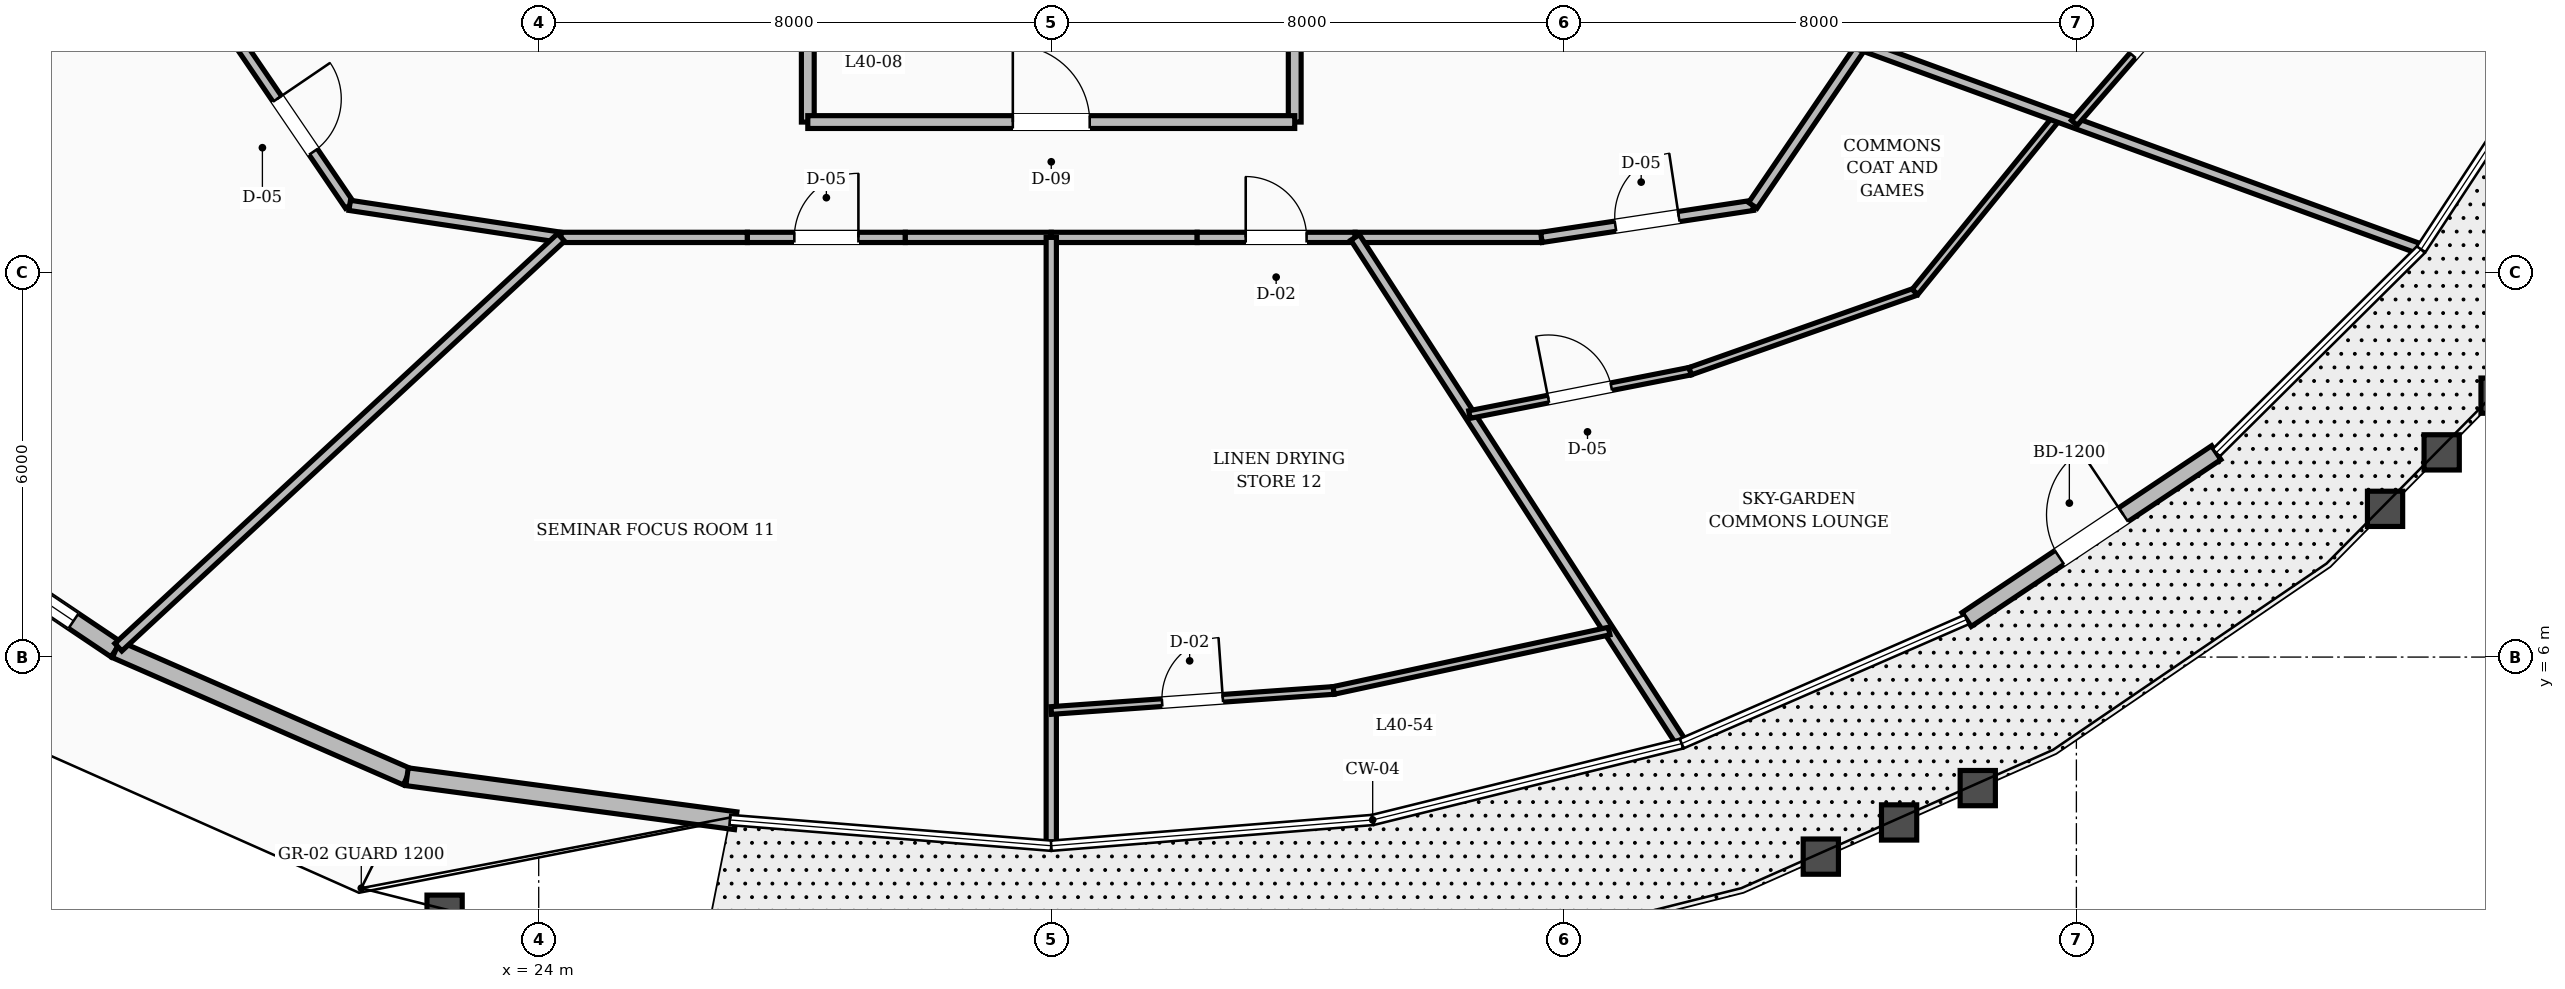
"""IFC4 building model, lengths in metres.
Left out: names, types, materials, properties, quantities, classifications, styles, units other than length and angle.
Written with IfcOpenShell. Run it as: python <this file> out.ifc"""

import sys

from ifc_helpers import new_model, si_unit, direction, frame, frame_2d, origin, place, context, subcontext, project, spatial, rectangle, extrude, element, fill, save


model = new_model("IFC4")
c1 = context("Model", 3, precision=1e-05, world=origin(), true_north=direction((0.0, 1.0)))
c2 = subcontext(c1, "Body", "Model", "MODEL_VIEW")
j1 = project(units=[si_unit("LENGTHUNIT", "METRE"), si_unit("PLANEANGLEUNIT", "RADIAN")], contexts=[c1])
p1 = place(None, origin())
s1 = spatial("IfcSite", under=j1, at=p1, CompositionType="ELEMENT")
p2 = place(p1, origin())
s2 = spatial("IfcBuilding", under=s1, at=p2, CompositionType="ELEMENT")
p3 = place(p2, frame((0.0, 0.0, 156.8)))
s3 = spatial("IfcBuildingStorey", under=s2, at=p3, CompositionType="ELEMENT", Elevation=156.8)
p4 = place(p3, frame((13.421, 8.794, 0.0), z_axis=(0.0, 0.0, 1.0), x_axis=(0.830095249601, -0.557621624931, 0.0)))
e1 = element("IfcWall", 1, at=p4, inside=s3, PredefinedType="STANDARD", context=c2, shape_type="SweptSolid", body=[
    extrude(rectangle(XDim=4.796, YDim=0.28, at=frame_2d((2.398, 0.0))), origin(), (0.0, 0.0, 1.0), 2.82),
])
p5 = place(p4, frame((0.798, 0.0, 0.8)))
e2 = element("IfcOpeningElement", 2, at=p5, cuts=e1, PredefinedType="OPENING", context=c2, shape_type="SweptSolid", body=[
    extrude(rectangle(XDim=3.2, YDim=1.65, at=frame_2d((1.6, 0.825))), frame((0.0, 0.15, 0.0), z_axis=(0.0, -1.0, 0.0), x_axis=(1.0, 0.0, 0.0)), (0.0, 0.0, 1.0), 0.3),
])
p6 = place(p3, frame((17.402, 6.12, 0.0), z_axis=(0.0, 0.0, 1.0), x_axis=(0.916185584373, -0.400754257603, 0.0)))
e3 = element("IfcWall", 3, at=p6, inside=s3, PredefinedType="STANDARD", context=c2, shape_type="SweptSolid", body=[
    extrude(rectangle(XDim=4.958, YDim=0.28, at=frame_2d((2.479, 0.0))), origin(), (0.0, 0.0, 1.0), 2.82),
])
p7 = place(p3, frame((21.945, 4.133, 0.0), z_axis=(0.0, 0.0, 1.0), x_axis=(0.991155650999, -0.132704466742, 0.0)))
e4 = element("IfcWall", 4, at=p7, inside=s3, PredefinedType="STANDARD", context=c2, shape_type="SweptSolid", body=[
    extrude(rectangle(XDim=5.175, YDim=0.28, at=frame_2d((2.587, 0.0))), origin(), (0.0, 0.0, 1.0), 2.82),
])
p8 = place(p3, frame((46.286, 6.585, 0.0), z_axis=(0.0, 0.0, 1.0), x_axis=(0.831368522851, 0.555721494286, 0.0)))
e5 = element("IfcWall", 5, at=p8, inside=s3, PredefinedType="STANDARD", context=c2, shape_type="SweptSolid", body=[
    extrude(rectangle(XDim=4.687, YDim=0.26, at=frame_2d((2.344, 0.0))), origin(), (0.0, 0.0, 1.0), 2.82),
])
p9 = place(p8, frame((1.744, 0.0, 0.0)))
e6 = element("IfcOpeningElement", 6, at=p9, cuts=e5, PredefinedType="OPENING", context=c2, shape_type="SweptSolid", body=[
    extrude(rectangle(XDim=1.2, YDim=2.15, at=frame_2d((0.6, 1.075))), frame((0.0, 0.14, 0.0), z_axis=(0.0, -1.0, 0.0), x_axis=(1.0, 0.0, 0.0)), (0.0, 0.0, 1.0), 0.28),
])
for number, where, z_axis, x_axis in (
    (7, (28.2, 14.35, 0.0), (0.0, 0.0, 1.0), (0.0, 1.0, 0.0)),
    (8, (35.8, 14.35, 0.0), (0.0, 0.0, 1.0), (0.0, 1.0, 0.0)),
):
    element("IfcWall", number, at=place(p3, frame(where, z_axis=z_axis, x_axis=x_axis)), inside=s3, PredefinedType="SOLIDWALL", context=c2, shape_type="SweptSolid", body=[
        extrude(rectangle(XDim=2.2, YDim=0.2, at=frame_2d((1.1, 0.0))), origin(), (0.0, 0.0, 1.0), 2.8),
    ])
p10 = place(p3, frame((28.2, 14.35, 0.0), z_axis=(0.0, 0.0, 1.0), x_axis=(1.0, 0.0, 0.0)))
e9 = element("IfcWall", 9, at=p10, inside=s3, PredefinedType="SOLIDWALL", context=c2, shape_type="SweptSolid", body=[
    extrude(rectangle(XDim=7.6, YDim=0.2, at=frame_2d((3.8, 0.0))), origin(), (0.0, 0.0, 1.0), 2.8),
])
p11 = place(p10, frame((3.2, 0.0, 0.0)))
e10 = element("IfcOpeningElement", 10, at=p11, cuts=e9, PredefinedType="OPENING", context=c2, shape_type="SweptSolid", body=[
    extrude(rectangle(XDim=1.2, YDim=2.1, at=frame_2d((0.6, 1.05))), frame((0.0, 0.11, 0.0), z_axis=(0.0, -1.0, 0.0), x_axis=(1.0, 0.0, 0.0)), (0.0, 0.0, 1.0), 0.22),
])
p12 = place(p3, frame((19.35, 15.548, 0.0), z_axis=(0.0, 0.0, 1.0), x_axis=(0.562674669208, -0.826678423955, 0.0)))
e11 = element("IfcWall", 11, at=p12, inside=s3, PredefinedType="SOLIDWALL", context=c2, shape_type="SweptSolid", body=[
    extrude(rectangle(XDim=3.021, YDim=0.16, at=frame_2d((1.511, 0.0))), origin(), (0.0, 0.0, 1.0), 2.8),
])
p13 = place(p12, frame((1.01, 0.0, 0.0)))
e12 = element("IfcOpeningElement", 12, at=p13, cuts=e11, PredefinedType="OPENING", context=c2, shape_type="SweptSolid", body=[
    extrude(rectangle(XDim=1.0, YDim=2.1, at=frame_2d((0.5, 1.05))), frame((0.0, 0.09, 0.0), z_axis=(0.0, -1.0, 0.0), x_axis=(1.0, 0.0, 0.0)), (0.0, 0.0, 1.0), 0.18),
])
p14 = place(p3, frame((21.05, 13.05, 0.0), z_axis=(0.0, 0.0, 1.0), x_axis=(0.988710906508, -0.149835721217, 0.0)))
e13 = element("IfcWall", 13, at=p14, inside=s3, PredefinedType="SOLIDWALL", context=c2, shape_type="SweptSolid", body=[
    extrude(rectangle(XDim=3.337, YDim=0.16, at=frame_2d((1.668, 0.0))), origin(), (0.0, 0.0, 1.0), 2.8),
])
p15 = place(p3, frame((24.349, 12.55, 0.0), z_axis=(0.0, 0.0, 1.0), x_axis=(1.0, 0.0, 0.0)))
e14 = element("IfcWall", 14, at=p15, inside=s3, PredefinedType="SOLIDWALL", context=c2, shape_type="SweptSolid", body=[
    extrude(rectangle(XDim=2.908, YDim=0.16, at=frame_2d((1.454, 0.0))), origin(), (0.0, 0.0, 1.0), 2.8),
])
p16 = place(p3, frame((27.257, 12.55, 0.0), z_axis=(0.0, 0.0, 1.0), x_axis=(1.0, 0.0, 0.0)))
e15 = element("IfcWall", 15, at=p16, inside=s3, PredefinedType="SOLIDWALL", context=c2, shape_type="SweptSolid", body=[
    extrude(rectangle(XDim=2.465, YDim=0.16, at=frame_2d((1.232, 0.0))), origin(), (0.0, 0.0, 1.0), 2.8),
])
p17 = place(p16, frame((0.733, 0.0, 0.0)))
e16 = element("IfcOpeningElement", 16, at=p17, cuts=e15, PredefinedType="OPENING", context=c2, shape_type="SweptSolid", body=[
    extrude(rectangle(XDim=1.0, YDim=2.1, at=frame_2d((0.5, 1.05))), frame((0.0, 0.09, 0.0), z_axis=(0.0, -1.0, 0.0), x_axis=(1.0, 0.0, 0.0)), (0.0, 0.0, 1.0), 0.18),
])
for number, where, z_axis, x_axis in (
    (17, (29.722, 12.55, 0.0), (0.0, 0.0, 1.0), (1.0, 0.0, 0.0)),
    (18, (32.0, 12.55, 0.0), (0.0, 0.0, 1.0), (1.0, 0.0, 0.0)),
):
    element("IfcWall", number, at=place(p3, frame(where, z_axis=z_axis, x_axis=x_axis)), inside=s3, PredefinedType="SOLIDWALL", context=c2, shape_type="SweptSolid", body=[
        extrude(rectangle(XDim=2.278, YDim=0.16, at=frame_2d((1.139, 0.0))), origin(), (0.0, 0.0, 1.0), 2.8),
    ])
p18 = place(p3, frame((34.278, 12.55, 0.0), z_axis=(0.0, 0.0, 1.0), x_axis=(1.0, 0.0, 0.0)))
e19 = element("IfcWall", 19, at=p18, inside=s3, PredefinedType="SOLIDWALL", context=c2, shape_type="SweptSolid", body=[
    extrude(rectangle(XDim=2.465, YDim=0.16, at=frame_2d((1.232, 0.0))), origin(), (0.0, 0.0, 1.0), 2.8),
])
p19 = place(p18, frame((0.758, 0.0, 0.0)))
e20 = element("IfcOpeningElement", 20, at=p19, cuts=e19, PredefinedType="OPENING", context=c2, shape_type="SweptSolid", body=[
    extrude(rectangle(XDim=0.95, YDim=2.1, at=frame_2d((0.475, 1.05))), frame((0.0, 0.09, 0.0), z_axis=(0.0, -1.0, 0.0), x_axis=(1.0, 0.0, 0.0)), (0.0, 0.0, 1.0), 0.18),
])
p20 = place(p3, frame((36.743, 12.55, 0.0), z_axis=(0.0, 0.0, 1.0), x_axis=(1.0, 0.0, 0.0)))
e21 = element("IfcWall", 21, at=p20, inside=s3, PredefinedType="SOLIDWALL", context=c2, shape_type="SweptSolid", body=[
    extrude(rectangle(XDim=2.908, YDim=0.16, at=frame_2d((1.454, 0.0))), origin(), (0.0, 0.0, 1.0), 2.8),
])
p21 = place(p3, frame((39.651, 12.55, 0.0), z_axis=(0.0, 0.0, 1.0), x_axis=(0.988710906508, 0.149835721217, 0.0)))
e22 = element("IfcWall", 22, at=p21, inside=s3, PredefinedType="SOLIDWALL", context=c2, shape_type="SweptSolid", body=[
    extrude(rectangle(XDim=3.337, YDim=0.16, at=frame_2d((1.668, 0.0))), origin(), (0.0, 0.0, 1.0), 2.8),
])
p22 = place(p21, frame((1.168, 0.0, 0.0)))
e23 = element("IfcOpeningElement", 23, at=p22, cuts=e22, PredefinedType="OPENING", context=c2, shape_type="SweptSolid", body=[
    extrude(rectangle(XDim=1.0, YDim=2.1, at=frame_2d((0.5, 1.05))), frame((0.0, 0.09, 0.0), z_axis=(0.0, -1.0, 0.0), x_axis=(1.0, 0.0, 0.0)), (0.0, 0.0, 1.0), 0.18),
])
p23 = place(p3, frame((42.95, 13.05, 0.0), z_axis=(0.0, 0.0, 1.0), x_axis=(0.562674669208, 0.826678423955, 0.0)))
e24 = element("IfcWall", 24, at=p23, inside=s3, PredefinedType="SOLIDWALL", context=c2, shape_type="SweptSolid", body=[
    extrude(rectangle(XDim=3.021, YDim=0.16, at=frame_2d((1.511, 0.0))), origin(), (0.0, 0.0, 1.0), 2.8),
])
p24 = place(p3, frame((36.743, 12.55, 0.0), z_axis=(0.0, 0.0, 1.0), x_axis=(0.542222596655, -0.840234881254, 0.0)))
e25 = element("IfcWall", 25, at=p24, inside=s3, PredefinedType="SOLIDWALL", context=c2, shape_type="SweptSolid", body=[
    extrude(rectangle(XDim=9.352, YDim=0.16, at=frame_2d((4.676, 0.0))), origin(), (0.0, 0.0, 1.0), 2.8),
])
p25 = place(p3, frame((38.527, 9.785, 0.0), z_axis=(0.0, 0.0, 1.0), x_axis=(0.981217112096, 0.192906658595, 0.0)))
e26 = element("IfcWall", 26, at=p25, inside=s3, PredefinedType="PARTITIONING", context=c2, shape_type="SweptSolid", body=[
    extrude(rectangle(XDim=3.512, YDim=0.12, at=frame_2d((1.756, 0.0))), origin(), (0.0, 0.0, 1.0), 2.8),
])
p26 = place(p25, frame((1.256, 0.0, 0.0)))
e27 = element("IfcOpeningElement", 27, at=p26, cuts=e26, PredefinedType="OPENING", context=c2, shape_type="SweptSolid", body=[
    extrude(rectangle(XDim=1.0, YDim=2.1, at=frame_2d((0.5, 1.05))), frame((0.0, 0.07, 0.0), z_axis=(0.0, -1.0, 0.0), x_axis=(1.0, 0.0, 0.0)), (0.0, 0.0, 1.0), 0.14),
])
p27 = place(p3, frame((41.973, 10.462, 0.0), z_axis=(0.0, 0.0, 1.0), x_axis=(0.943136844467, 0.332404712075, 0.0)))
e28 = element("IfcWall", 28, at=p27, inside=s3, PredefinedType="PARTITIONING", context=c2, shape_type="SweptSolid", body=[
    extrude(rectangle(XDim=3.72, YDim=0.12, at=frame_2d((1.86, 0.0))), origin(), (0.0, 0.0, 1.0), 2.8),
])
p28 = place(p3, frame((45.482, 11.699, 0.0), z_axis=(0.0, 0.0, 1.0), x_axis=(0.631043665678, 0.775747311957, 0.0)))
e29 = element("IfcWall", 29, at=p28, inside=s3, PredefinedType="PARTITIONING", context=c2, shape_type="SweptSolid", body=[
    extrude(rectangle(XDim=3.524, YDim=0.12, at=frame_2d((1.762, 0.0))), origin(), (0.0, 0.0, 1.0), 2.8),
])
p29 = place(p3, frame((44.65, 15.548, 0.0), z_axis=(0.0, 0.0, 1.0), x_axis=(0.939495403678, -0.342561507568, 0.0)))
e30 = element("IfcWall", 30, at=p29, inside=s3, PredefinedType="SOLIDWALL", context=c2, shape_type="SweptSolid", body=[
    extrude(rectangle(XDim=9.244, YDim=0.16, at=frame_2d((4.622, 0.0))), origin(), (0.0, 0.0, 1.0), 2.8),
])
p30 = place(p3, frame((47.968, 14.338, 0.0), z_axis=(0.0, 0.0, 1.0), x_axis=(0.655911700686, 0.754837625522, 0.0)))
e31 = element("IfcWall", 31, at=p30, inside=s3, PredefinedType="PARTITIONING", context=c2, shape_type="SweptSolid", body=[
    extrude(rectangle(XDim=3.645, YDim=0.12, at=frame_2d((1.823, 0.0))), origin(), (0.0, 0.0, 1.0), 2.8),
])
p31 = place(p30, frame((1.393, 0.0, 0.0)))
e32 = element("IfcOpeningElement", 32, at=p31, cuts=e31, PredefinedType="OPENING", context=c2, shape_type="SweptSolid", body=[
    extrude(rectangle(XDim=0.86, YDim=2.1, at=frame_2d((0.43, 1.05))), frame((0.0, 0.07, 0.0), z_axis=(0.0, -1.0, 0.0), x_axis=(1.0, 0.0, 0.0)), (0.0, 0.0, 1.0), 0.14),
])
p32 = place(p3, frame((24.349, 12.55, 0.0), z_axis=(0.0, 0.0, 1.0), x_axis=(-0.733869336749, -0.679290656921, 0.0)))
e33 = element("IfcWall", 33, at=p32, inside=s3, PredefinedType="SOLIDWALL", context=c2, shape_type="SweptSolid", body=[
    extrude(rectangle(XDim=9.416, YDim=0.16, at=frame_2d((4.708, 0.0))), origin(), (0.0, 0.0, 1.0), 2.8),
])
p33 = place(p3, frame((32.0, 12.55, 0.0), z_axis=(0.0, 0.0, 1.0), x_axis=(0.0, -1.0, 0.0)))
e34 = element("IfcWall", 34, at=p33, inside=s3, PredefinedType="SOLIDWALL", context=c2, shape_type="SweptSolid", body=[
    extrude(rectangle(XDim=9.444, YDim=0.16, at=frame_2d((4.722, 0.0))), origin(), (0.0, 0.0, 1.0), 2.8),
])
p34 = place(p3, frame((32.0, 5.167, 0.0), z_axis=(0.0, 0.0, 1.0), x_axis=(0.99748834157, 0.070830843796, 0.0)))
e35 = element("IfcWall", 35, at=p34, inside=s3, PredefinedType="PARTITIONING", context=c2, shape_type="SweptSolid", body=[
    extrude(rectangle(XDim=4.419, YDim=0.12, at=frame_2d((2.209, 0.0))), origin(), (0.0, 0.0, 1.0), 2.8),
])
p35 = place(p34, frame((1.734, 0.0, 0.0)))
e36 = element("IfcOpeningElement", 36, at=p35, cuts=e35, PredefinedType="OPENING", context=c2, shape_type="SweptSolid", body=[
    extrude(rectangle(XDim=0.95, YDim=2.1, at=frame_2d((0.475, 1.05))), frame((0.0, 0.07, 0.0), z_axis=(0.0, -1.0, 0.0), x_axis=(1.0, 0.0, 0.0)), (0.0, 0.0, 1.0), 0.14),
])
p36 = place(p3, frame((36.408, 5.479, 0.0), z_axis=(0.0, 0.0, 1.0), x_axis=(0.977549074865, 0.21070786941, 0.0)))
e37 = element("IfcWall", 37, at=p36, inside=s3, PredefinedType="PARTITIONING", context=c2, shape_type="SweptSolid", body=[
    extrude(rectangle(XDim=4.398, YDim=0.12, at=frame_2d((2.199, 0.0))), origin(), (0.0, 0.0, 1.0), 2.8),
])
p37 = place(p5, origin())
e38 = element("IfcWindow", 38, at=p37, inside=s3, PartitioningType="SINGLE_PANEL", PredefinedType="WINDOW", context=c2, shape_type="SweptSolid", body=[
    extrude(rectangle(XDim=3.2, YDim=1.65, at=frame_2d((1.6, 0.825))), frame((0.0, 0.03, 0.0), z_axis=(0.0, -1.0, 0.0), x_axis=(1.0, 0.0, 0.0)), (0.0, 0.0, 1.0), 0.06),
])
fill(e2, e38)
p38 = place(p9, origin())
e39 = element("IfcDoor", 39, at=p38, inside=s3, OperationType="SINGLE_SWING_RIGHT", PredefinedType="DOOR", context=c2, shape_type="SweptSolid", body=[
    extrude(rectangle(XDim=1.2, YDim=2.15, at=frame_2d((0.6, 1.075))), frame((0.0, 0.025, 0.0), z_axis=(0.0, -1.0, 0.0), x_axis=(1.0, 0.0, 0.0)), (0.0, 0.0, 1.0), 0.05),
])
fill(e6, e39)
p39 = place(p11, origin())
e40 = element("IfcDoor", 40, at=p39, inside=s3, OperationType="SINGLE_SWING_LEFT", PredefinedType="DOOR", context=c2, shape_type="SweptSolid", body=[
    extrude(rectangle(XDim=1.2, YDim=2.1, at=frame_2d((0.6, 1.05))), frame((0.0, 0.025, 0.0), z_axis=(0.0, -1.0, 0.0), x_axis=(1.0, 0.0, 0.0)), (0.0, 0.0, 1.0), 0.05),
])
fill(e10, e40)
p40 = place(p22, origin())
e41 = element("IfcDoor", 41, at=p40, inside=s3, OperationType="SINGLE_SWING_RIGHT", PredefinedType="DOOR", context=c2, shape_type="SweptSolid", body=[
    extrude(rectangle(XDim=1.0, YDim=2.1, at=frame_2d((0.5, 1.05))), frame((0.0, 0.025, 0.0), z_axis=(0.0, -1.0, 0.0), x_axis=(1.0, 0.0, 0.0)), (0.0, 0.0, 1.0), 0.05),
])
fill(e23, e41)
p41 = place(p26, origin())
e42 = element("IfcDoor", 42, at=p41, inside=s3, OperationType="SINGLE_SWING_LEFT", PredefinedType="DOOR", context=c2, shape_type="SweptSolid", body=[
    extrude(rectangle(XDim=1.0, YDim=2.1, at=frame_2d((0.5, 1.05))), frame((0.0, 0.025, 0.0), z_axis=(0.0, -1.0, 0.0), x_axis=(1.0, 0.0, 0.0)), (0.0, 0.0, 1.0), 0.05),
])
fill(e27, e42)
p42 = place(p31, origin())
e43 = element("IfcDoor", 43, at=p42, inside=s3, OperationType="SINGLE_SWING_RIGHT", PredefinedType="DOOR", context=c2, shape_type="SweptSolid", body=[
    extrude(rectangle(XDim=0.86, YDim=2.1, at=frame_2d((0.43, 1.05))), frame((0.0, 0.025, 0.0), z_axis=(0.0, -1.0, 0.0), x_axis=(1.0, 0.0, 0.0)), (0.0, 0.0, 1.0), 0.05),
])
fill(e32, e43)
p43 = place(p13, origin())
e44 = element("IfcDoor", 44, at=p43, inside=s3, OperationType="SINGLE_SWING_LEFT", PredefinedType="DOOR", context=c2, shape_type="SweptSolid", body=[
    extrude(rectangle(XDim=1.0, YDim=2.1, at=frame_2d((0.5, 1.05))), frame((0.0, 0.025, 0.0), z_axis=(0.0, -1.0, 0.0), x_axis=(1.0, 0.0, 0.0)), (0.0, 0.0, 1.0), 0.05),
])
fill(e12, e44)
p44 = place(p17, origin())
e45 = element("IfcDoor", 45, at=p44, inside=s3, OperationType="SINGLE_SWING_RIGHT", PredefinedType="DOOR", context=c2, shape_type="SweptSolid", body=[
    extrude(rectangle(XDim=1.0, YDim=2.1, at=frame_2d((0.5, 1.05))), frame((0.0, 0.025, 0.0), z_axis=(0.0, -1.0, 0.0), x_axis=(1.0, 0.0, 0.0)), (0.0, 0.0, 1.0), 0.05),
])
fill(e16, e45)
p45 = place(p19, origin())
e46 = element("IfcDoor", 46, at=p45, inside=s3, OperationType="SINGLE_SWING_LEFT", PredefinedType="DOOR", context=c2, shape_type="SweptSolid", body=[
    extrude(rectangle(XDim=0.95, YDim=2.1, at=frame_2d((0.475, 1.05))), frame((0.0, 0.025, 0.0), z_axis=(0.0, -1.0, 0.0), x_axis=(1.0, 0.0, 0.0)), (0.0, 0.0, 1.0), 0.05),
])
fill(e20, e46)
p46 = place(p35, origin())
e47 = element("IfcDoor", 47, at=p46, inside=s3, OperationType="SINGLE_SWING_RIGHT", PredefinedType="DOOR", context=c2, shape_type="SweptSolid", body=[
    extrude(rectangle(XDim=0.95, YDim=2.1, at=frame_2d((0.475, 1.05))), frame((0.0, 0.025, 0.0), z_axis=(0.0, -1.0, 0.0), x_axis=(1.0, 0.0, 0.0)), (0.0, 0.0, 1.0), 0.05),
])
fill(e36, e47)
save(model, sys.argv[1])
